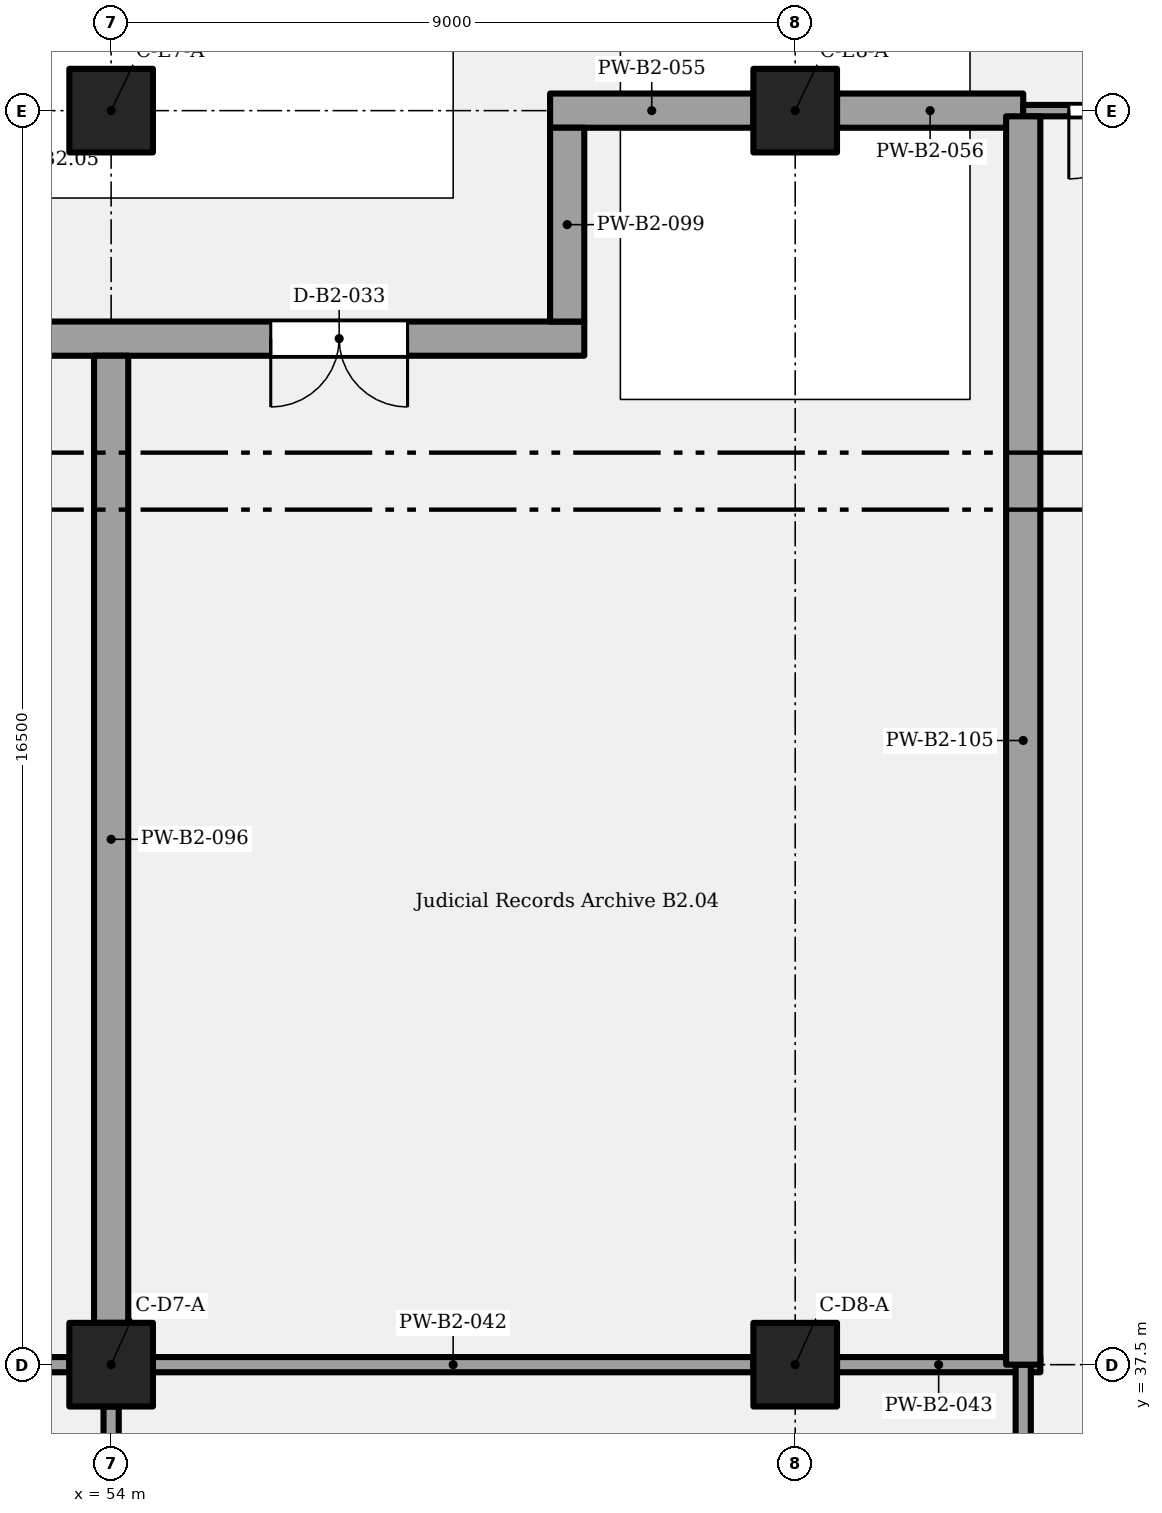
"""IFC4 building model, lengths in metres.
Left out: names, types, materials, properties, quantities, classifications, styles, units other than length and angle.
Written with IfcOpenShell. Run it as: python <this file> out.ifc"""

import sys

from ifc_helpers import new_model, si_unit, direction, frame, frame_2d, origin, origin_2d, place, context, subcontext, project, spatial, rectangle, extrude, element, fill, save


model = new_model("IFC4")
c1 = context("Model", 3, precision=1e-05, world=origin(), true_north=direction((0.0, 1.0)))
c2 = subcontext(c1, "Body", "Model", "MODEL_VIEW")
j1 = project(units=[si_unit("LENGTHUNIT", "METRE"), si_unit("PLANEANGLEUNIT", "RADIAN")], contexts=[c1])
p1 = place(None, origin())
s1 = spatial("IfcSite", under=j1, at=p1, CompositionType="ELEMENT")
p2 = place(p1, origin())
s2 = spatial("IfcBuilding", under=s1, at=p2, CompositionType="ELEMENT")
p3 = place(p2, frame((0.0, 0.0, -8.4)))
s3 = spatial("IfcBuildingStorey", under=s2, at=p3, CompositionType="ELEMENT", Elevation=-8.4)
for number, where, z_axis, x_axis in (
    (1, (54.0, 37.5, 0.0), (0.0, 0.0, 1.0), (1.0, 0.0, 0.0)),
    (2, (63.0, 37.5, 0.0), (0.0, 0.0, 1.0), (1.0, 0.0, 0.0)),
    (3, (54.0, 54.0, 0.0), (0.0, 0.0, 1.0), (1.0, 0.0, 0.0)),
    (4, (63.0, 54.0, 0.0), (0.0, 0.0, 1.0), (1.0, 0.0, 0.0)),
):
    element("IfcColumn", number, at=place(p3, frame(where, z_axis=z_axis, x_axis=x_axis)), inside=s3, PredefinedType="COLUMN", context=c2, shape_type="SweptSolid", body=[
        extrude(rectangle(XDim=1.1, YDim=1.1, at=origin_2d()), origin(), (0.0, 0.0, 1.0), 4.2),
    ])
for number, where, z_axis, x_axis in (
    (5, (45.55, 37.5, 0.0), (0.0, 0.0, 1.0), (1.0, 0.0, 0.0)),
    (6, (54.55, 37.5, 0.0), (0.0, 0.0, 1.0), (1.0, 0.0, 0.0)),
):
    element("IfcWall", number, at=place(p3, frame(where, z_axis=z_axis, x_axis=x_axis)), inside=s3, PredefinedType="PARTITIONING", context=c2, shape_type="SweptSolid", body=[
        extrude(rectangle(XDim=7.9, YDim=0.2, at=frame_2d((3.95, 0.0))), origin(), (0.0, 0.0, 1.0), 3.05),
    ])
p4 = place(p3, frame((63.55, 37.5, 0.0), z_axis=(0.0, 0.0, 1.0), x_axis=(1.0, 0.0, 0.0)))
e7 = element("IfcWall", 7, at=p4, inside=s3, PredefinedType="PARTITIONING", context=c2, shape_type="SweptSolid", body=[
    extrude(rectangle(XDim=2.675, YDim=0.2, at=frame_2d((1.337, 0.0))), origin(), (0.0, 0.0, 1.0), 3.05),
])
p5 = place(p3, frame((35.775, 51.0, 0.0), z_axis=(0.0, 0.0, 1.0), x_axis=(1.0, 0.0, 0.0)))
e8 = element("IfcWall", 8, at=p5, inside=s3, PredefinedType="PARTITIONING", context=c2, shape_type="SweptSolid", body=[
    extrude(rectangle(XDim=24.45, YDim=0.45, at=frame_2d((12.225, 0.0))), origin(), (0.0, 0.0, 1.0), 3.8),
])
p6 = place(p5, frame((5.625, 0.0, 0.0), z_axis=(0.0, 0.0, 1.0), x_axis=(-1.0, 0.0, 0.0)))
e9 = element("IfcOpeningElement", 9, at=p6, cuts=e8, PredefinedType="OPENING", context=c2, shape_type="SweptSolid", body=[
    extrude(rectangle(XDim=1.8, YDim=2.4, at=frame_2d((0.9, 1.2))), frame((0.0, 0.235, 0.0), z_axis=(0.0, -1.0, 0.0), x_axis=(1.0, 0.0, 0.0)), (0.0, 0.0, 1.0), 0.47),
])
p7 = place(p5, frame((14.225, 0.0, 0.0), z_axis=(0.0, 0.0, 1.0), x_axis=(-1.0, 0.0, 0.0)))
e10 = element("IfcOpeningElement", 10, at=p7, cuts=e8, PredefinedType="OPENING", context=c2, shape_type="SweptSolid", body=[
    extrude(rectangle(XDim=1.0, YDim=2.1, at=frame_2d((0.5, 1.05))), frame((0.0, 0.235, 0.0), z_axis=(0.0, -1.0, 0.0), x_axis=(1.0, 0.0, 0.0)), (0.0, 0.0, 1.0), 0.47),
])
p8 = place(p5, frame((22.125, 0.0, 0.0), z_axis=(0.0, 0.0, 1.0), x_axis=(-1.0, 0.0, 0.0)))
e11 = element("IfcOpeningElement", 11, at=p8, cuts=e8, PredefinedType="OPENING", context=c2, shape_type="SweptSolid", body=[
    extrude(rectangle(XDim=1.8, YDim=2.4, at=frame_2d((0.9, 1.2))), frame((0.0, 0.235, 0.0), z_axis=(0.0, -1.0, 0.0), x_axis=(1.0, 0.0, 0.0)), (0.0, 0.0, 1.0), 0.47),
])
p9 = place(p3, frame((59.775, 54.0, 0.0), z_axis=(0.0, 0.0, 1.0), x_axis=(1.0, 0.0, 0.0)))
e12 = element("IfcWall", 12, at=p9, inside=s3, PredefinedType="PARTITIONING", context=c2, shape_type="SweptSolid", body=[
    extrude(rectangle(XDim=2.675, YDim=0.45, at=frame_2d((1.337, 0.0))), origin(), (0.0, 0.0, 1.0), 3.05),
])
p10 = place(p3, frame((63.55, 54.0, 0.0), z_axis=(0.0, 0.0, 1.0), x_axis=(1.0, 0.0, 0.0)))
e13 = element("IfcWall", 13, at=p10, inside=s3, PredefinedType="PARTITIONING", context=c2, shape_type="SweptSolid", body=[
    extrude(rectangle(XDim=2.45, YDim=0.45, at=frame_2d((1.225, 0.0))), origin(), (0.0, 0.0, 1.0), 3.05),
])
p11 = place(p3, frame((66.0, 54.0, 0.0), z_axis=(0.0, 0.0, 1.0), x_axis=(1.0, 0.0, 0.0)))
e14 = element("IfcWall", 14, at=p11, inside=s3, PredefinedType="PARTITIONING", context=c2, shape_type="SweptSolid", body=[
    extrude(rectangle(XDim=3.0, YDim=0.15, at=frame_2d((1.5, 0.0))), origin(), (0.0, 0.0, 1.0), 3.05),
])
p12 = place(p11, frame((2.4, 0.0, 0.0), z_axis=(0.0, 0.0, 1.0), x_axis=(-1.0, 0.0, 0.0)))
e15 = element("IfcOpeningElement", 15, at=p12, cuts=e14, PredefinedType="OPENING", context=c2, shape_type="SweptSolid", body=[
    extrude(rectangle(XDim=1.8, YDim=2.1, at=frame_2d((0.9, 1.05))), frame((0.0, 0.085, 0.0), z_axis=(0.0, -1.0, 0.0), x_axis=(1.0, 0.0, 0.0)), (0.0, 0.0, 1.0), 0.17),
])
p13 = place(p3, frame((54.0, 31.6, 0.0), z_axis=(0.0, 0.0, 1.0), x_axis=(0.0, 1.0, 0.0)))
e16 = element("IfcWall", 16, at=p13, inside=s3, PredefinedType="PARTITIONING", context=c2, shape_type="SweptSolid", body=[
    extrude(rectangle(XDim=5.35, YDim=0.2, at=frame_2d((2.675, 0.0))), origin(), (0.0, 0.0, 1.0), 3.05),
])
p14 = place(p3, frame((54.0, 38.05, 0.0), z_axis=(0.0, 0.0, 1.0), x_axis=(0.0, 1.0, 0.0)))
e17 = element("IfcWall", 17, at=p14, inside=s3, PredefinedType="PARTITIONING", context=c2, shape_type="SweptSolid", body=[
    extrude(rectangle(XDim=12.725, YDim=0.45, at=frame_2d((6.362, 0.0))), origin(), (0.0, 0.0, 1.0), 2.85),
])
p15 = place(p3, frame((60.0, 51.225, 0.0), z_axis=(0.0, 0.0, 1.0), x_axis=(0.0, 1.0, 0.0)))
e18 = element("IfcWall", 18, at=p15, inside=s3, PredefinedType="PARTITIONING", context=c2, shape_type="SweptSolid", body=[
    extrude(rectangle(XDim=2.55, YDim=0.45, at=frame_2d((1.275, 0.0))), origin(), (0.0, 0.0, 1.0), 3.8),
])
p16 = place(p3, frame((66.0, 31.5, 0.0), z_axis=(0.0, 0.0, 1.0), x_axis=(0.0, 1.0, 0.0)))
e19 = element("IfcWall", 19, at=p16, inside=s3, PredefinedType="PARTITIONING", context=c2, shape_type="SweptSolid", body=[
    extrude(rectangle(XDim=6.0, YDim=0.2, at=frame_2d((3.0, 0.0))), origin(), (0.0, 0.0, 1.0), 3.8),
])
p17 = place(p3, frame((66.0, 37.5, 0.0), z_axis=(0.0, 0.0, 1.0), x_axis=(0.0, 1.0, 0.0)))
e20 = element("IfcWall", 20, at=p17, inside=s3, PredefinedType="PARTITIONING", context=c2, shape_type="SweptSolid", body=[
    extrude(rectangle(XDim=16.425, YDim=0.45, at=frame_2d((8.212, 0.0))), origin(), (0.0, 0.0, 1.0), 3.8),
])
p18 = place(p12, origin())
e21 = element("IfcDoor", 21, at=p18, inside=s3, OperationType="DOUBLE_DOOR_SINGLE_SWING", PredefinedType="DOOR", context=c2, shape_type="SweptSolid", body=[
    extrude(rectangle(XDim=1.8, YDim=2.1, at=frame_2d((0.9, 1.05))), frame((0.0, 0.025, 0.0), z_axis=(0.0, -1.0, 0.0), x_axis=(1.0, 0.0, 0.0)), (0.0, 0.0, 1.0), 0.05),
])
fill(e15, e21)
p19 = place(p8, origin())
e22 = element("IfcDoor", 22, at=p19, inside=s3, OperationType="DOUBLE_DOOR_SINGLE_SWING", PredefinedType="DOOR", context=c2, shape_type="SweptSolid", body=[
    extrude(rectangle(XDim=1.8, YDim=2.4, at=frame_2d((0.9, 1.2))), frame((0.0, 0.025, 0.0), z_axis=(0.0, -1.0, 0.0), x_axis=(1.0, 0.0, 0.0)), (0.0, 0.0, 1.0), 0.05),
])
fill(e11, e22)
save(model, sys.argv[1])
